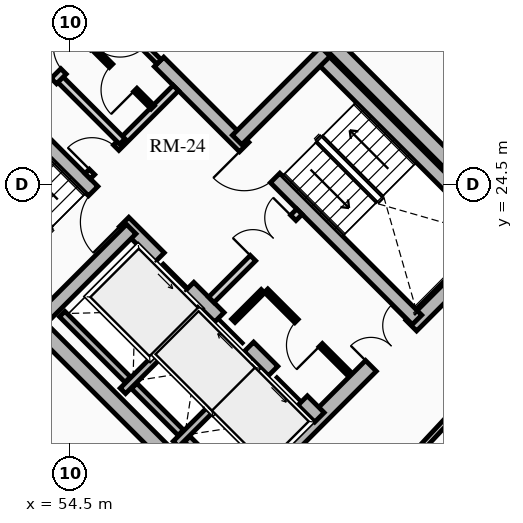
"""IFC4 building model, lengths in metres.
Left out: names, types, materials, properties, quantities, classifications, styles, units other than length and angle.
Written with IfcOpenShell. Run it as: python <this file> out.ifc"""

import sys

from ifc_helpers import new_model, si_unit, direction, frame, frame_2d, origin, place, context, subcontext, project, spatial, rectangle, extrude, source, transform, mapped, element, fill, save


model = new_model("IFC4")
c1 = context("Model", 3, precision=1e-05, world=origin(), true_north=direction((0.0, 1.0)))
c2 = subcontext(c1, "Body", "Model", "MODEL_VIEW")
j1 = project(units=[si_unit("LENGTHUNIT", "METRE"), si_unit("PLANEANGLEUNIT", "RADIAN")], contexts=[c1])
p1 = place(None, origin())
s1 = spatial("IfcSite", under=j1, at=p1, CompositionType="ELEMENT")
p2 = place(p1, origin())
s2 = spatial("IfcBuilding", under=s1, at=p2, CompositionType="ELEMENT")
p3 = place(p2, frame((0.0, 0.0, 205.39)))
s3 = spatial("IfcBuildingStorey", under=s2, at=p3, CompositionType="ELEMENT", Elevation=205.39)
for number, where, z_axis, x_axis in (
    (1, (58.702, 15.732, 0.0), (0.0, 0.0, 1.0), (-0.707, 0.707, 0.0)),
    (2, (66.268, 23.298, 0.0), (0.0, 0.0, 1.0), (-0.707, 0.707, 0.0)),
):
    element("IfcWall", number, at=place(p3, frame(where, z_axis=z_axis, x_axis=x_axis)), inside=s3, PredefinedType="SHEAR", context=c2, shape_type="SweptSolid", body=[
        extrude(rectangle(XDim=14.1, YDim=0.4, at=frame_2d((7.05, 0.0))), origin(), (0.0, 0.0, 1.0), 2.91),
    ])
p4 = place(p3, frame((58.561, 15.873, 0.0), z_axis=(0.0, 0.0, 1.0), x_axis=(0.707106781187, 0.707106781187, 0.0)))
e3 = element("IfcWall", 3, at=p4, inside=s3, PredefinedType="SHEAR", context=c2, shape_type="SweptSolid", body=[
    extrude(rectangle(XDim=10.7, YDim=0.4, at=frame_2d((5.35, 0.0))), origin(), (0.0, 0.0, 1.0), 2.91),
])
m1 = source(origin(), c2, "Body", "SweptSolid", [
    extrude(rectangle(XDim=1.5, YDim=2.02, at=frame_2d((0.75, 1.01))), frame((0.0, 0.21, 0.0), z_axis=(0.0, -1.0, 0.0), x_axis=(1.0, 0.0, 0.0)), (0.0, 0.0, 1.0), 0.42),
])
p5 = place(p4, frame((5.45, 0.0, 0.0)))
e4 = element("IfcOpeningElement", 4, at=p5, cuts=e3, PredefinedType="OPENING", context=c2, shape_type="MappedRepresentation", body=[
    mapped(m1, transform((0.0, 0.0, 0.0), x_axis=(1.0, 0.0, 0.0), y_axis=(0.0, 1.0, 0.0), z_axis=(0.0, 0.0, 1.0), scale=1.0)),
])
p6 = place(p3, frame((48.873, 25.561, 0.0), z_axis=(0.0, 0.0, 1.0), x_axis=(0.707106781187, 0.707106781187, 0.0)))
e5 = element("IfcWall", 5, at=p6, inside=s3, PredefinedType="SHEAR", context=c2, shape_type="SweptSolid", body=[
    extrude(rectangle(XDim=10.7, YDim=0.4, at=frame_2d((5.35, 0.0))), origin(), (0.0, 0.0, 1.0), 2.91),
])
p7 = place(p6, frame((4.6, 0.0, 0.0)))
e6 = element("IfcOpeningElement", 6, at=p7, cuts=e5, PredefinedType="OPENING", context=c2, shape_type="MappedRepresentation", body=[
    mapped(m1, transform((0.0, 0.0, 0.0), x_axis=(1.0, 0.0, 0.0), y_axis=(0.0, 1.0, 0.0), z_axis=(0.0, 0.0, 1.0), scale=1.0)),
])
p8 = place(p3, frame((61.06, 18.373, 0.0), z_axis=(0.0, 0.0, 1.0), x_axis=(-0.707106781187, 0.707106781187, 0.0)))
e7 = element("IfcWall", 7, at=p8, inside=s3, PredefinedType="SHEAR", context=c2, shape_type="SweptSolid", body=[
    extrude(rectangle(XDim=13.7, YDim=0.35, at=frame_2d((6.85, 0.0))), origin(), (0.0, 0.0, 1.0), 2.91),
])
m2 = source(origin(), c2, "Body", "SweptSolid", [
    extrude(rectangle(XDim=1.1, YDim=2.015, at=frame_2d((0.55, 1.007))), frame((0.0, 0.185, 0.0), z_axis=(0.0, -1.0, 0.0), x_axis=(1.0, 0.0, 0.0)), (0.0, 0.0, 1.0), 0.37),
])
p9 = place(p8, frame((4.85, 0.0, 0.0)))
e8 = element("IfcOpeningElement", 8, at=p9, cuts=e7, PredefinedType="OPENING", context=c2, shape_type="MappedRepresentation", body=[
    mapped(m2, transform((0.0, 0.0, 0.0), x_axis=(1.0, 0.0, 0.0), y_axis=(0.0, 1.0, 0.0), z_axis=(0.0, 0.0, 1.0), scale=1.0)),
])
p10 = place(p8, frame((0.625, 0.0, 0.0)))
e9 = element("IfcOpeningElement", 9, at=p10, cuts=e7, PredefinedType="OPENING", context=c2, shape_type="MappedRepresentation", body=[
    mapped(m2, transform((0.0, 0.0, 0.0), x_axis=(1.0, 0.0, 0.0), y_axis=(0.0, 1.0, 0.0), z_axis=(0.0, 0.0, 1.0), scale=1.0)),
])
p11 = place(p8, frame((2.625, 0.0, 0.0)))
e10 = element("IfcOpeningElement", 10, at=p11, cuts=e7, PredefinedType="OPENING", context=c2, shape_type="MappedRepresentation", body=[
    mapped(m2, transform((0.0, 0.0, 0.0), x_axis=(1.0, 0.0, 0.0), y_axis=(0.0, 1.0, 0.0), z_axis=(0.0, 0.0, 1.0), scale=1.0)),
])
m3 = source(origin(), c2, "Body", "SweptSolid", [
    extrude(rectangle(XDim=1.15, YDim=2.02, at=frame_2d((0.575, 1.01))), frame((0.0, 0.185, 0.0), z_axis=(0.0, -1.0, 0.0), x_axis=(1.0, 0.0, 0.0)), (0.0, 0.0, 1.0), 0.37),
])
p12 = place(p8, frame((7.27, 0.0, 0.0)))
e11 = element("IfcOpeningElement", 11, at=p12, cuts=e7, PredefinedType="OPENING", context=c2, shape_type="MappedRepresentation", body=[
    mapped(m3, transform((0.0, 0.0, 0.0), x_axis=(1.0, 0.0, 0.0), y_axis=(0.0, 1.0, 0.0), z_axis=(0.0, 0.0, 1.0), scale=1.0)),
])
p13 = place(p3, frame((63.627, 20.94, 0.0), z_axis=(0.0, 0.0, 1.0), x_axis=(-0.707119496762, 0.707094065383, 0.0)))
e12 = element("IfcWall", 12, at=p13, inside=s3, PredefinedType="SHEAR", context=c2, shape_type="SweptSolid", body=[
    extrude(rectangle(XDim=9.6, YDim=0.35, at=frame_2d((4.8, 0.0))), origin(), (0.0, 0.0, 1.0), 2.91),
])
p14 = place(p13, frame((5.28, 0.0, 0.0)))
e13 = element("IfcOpeningElement", 13, at=p14, cuts=e12, PredefinedType="OPENING", context=c2, shape_type="MappedRepresentation", body=[
    mapped(m3, transform((0.0, 0.0, 0.0), x_axis=(1.0, 0.0, 0.0), y_axis=(0.0, 1.0, 0.0), z_axis=(0.0, 0.0, 1.0), scale=1.0)),
])
p15 = place(p3, frame((53.922, 21.141, 0.0), z_axis=(0.0, 0.0, 1.0), x_axis=(-0.707106781187, 0.707106781187, 0.0)))
e14 = element("IfcWall", 14, at=p15, inside=s3, PredefinedType="SHEAR", context=c2, shape_type="SweptSolid", body=[
    extrude(rectangle(XDim=6.695, YDim=0.35, at=frame_2d((3.348, 0.0))), origin(), (0.0, 0.0, 1.0), 2.91),
])
p16 = place(p3, frame((53.784, 21.003, 0.0), z_axis=(0.0, 0.0, 1.0), x_axis=(0.707106781187, 0.707106781187, 0.0)))
e15 = element("IfcWall", 15, at=p16, inside=s3, PredefinedType="SHEAR", context=c2, shape_type="SweptSolid", body=[
    extrude(rectangle(XDim=3.285, YDim=0.35, at=frame_2d((1.643, 0.0))), origin(), (0.0, 0.0, 1.0), 2.91),
])
p17 = place(p3, frame((65.812, 23.125, 0.0), z_axis=(0.0, 0.0, 1.0), x_axis=(-0.707106781187, 0.707106781187, 0.0)))
e16 = element("IfcWall", 16, at=p17, inside=s3, PredefinedType="SHEAR", context=c2, shape_type="SweptSolid", body=[
    extrude(rectangle(XDim=6.695, YDim=0.35, at=frame_2d((3.348, 0.0))), origin(), (0.0, 0.0, 1.0), 2.91),
])
p18 = place(p3, frame((58.893, 25.674, 0.0), z_axis=(0.0, 0.0, 1.0), x_axis=(0.707106781187, 0.707106781187, 0.0)))
e17 = element("IfcWall", 17, at=p18, inside=s3, PredefinedType="SHEAR", context=c2, shape_type="SweptSolid", body=[
    extrude(rectangle(XDim=3.285, YDim=0.35, at=frame_2d((1.643, 0.0))), origin(), (0.0, 0.0, 1.0), 2.91),
])
p19 = place(p3, frame((55.888, 19.069, 0.0), z_axis=(0.0, 0.0, 1.0), x_axis=(0.707106781187, 0.707106781187, 0.0)))
e18 = element("IfcWall", 18, at=p19, inside=s3, PredefinedType="SHEAR", context=c2, shape_type="SweptSolid", body=[
    extrude(rectangle(XDim=2.97, YDim=0.2, at=frame_2d((1.485, 0.0))), origin(), (0.0, 0.0, 1.0), 2.91),
])
p20 = place(p3, frame((56.015, 19.366, 0.0), z_axis=(0.0, 0.0, 1.0), x_axis=(-0.707106781187, 0.707106781187, 0.0)))
e19 = element("IfcWall", 19, at=p20, inside=s3, PredefinedType="SHEAR", context=c2, shape_type="SweptSolid", body=[
    extrude(rectangle(XDim=2.44, YDim=0.2, at=frame_2d((1.22, 0.0))), origin(), (0.0, 0.0, 1.0), 2.91),
])
p21 = place(p3, frame((57.284, 17.673, 0.0), z_axis=(0.0, 0.0, 1.0), x_axis=(0.707147878904, 0.70706568108, 0.0)))
e20 = element("IfcWall", 20, at=p21, inside=s3, PredefinedType="SHEAR", context=c2, shape_type="SweptSolid", body=[
    extrude(rectangle(XDim=2.97, YDim=0.2, at=frame_2d((1.485, 0.0))), origin(), (0.0, 0.0, 1.0), 2.91),
])
p22 = place(p3, frame((57.412, 17.97, 0.0), z_axis=(0.0, 0.0, 1.0), x_axis=(-0.707106781187, 0.707106781187, 0.0)))
e21 = element("IfcWall", 21, at=p22, inside=s3, PredefinedType="SHEAR", context=c2, shape_type="SweptSolid", body=[
    extrude(rectangle(XDim=1.735, YDim=0.2, at=frame_2d((0.867, 0.0))), origin(), (0.0, 0.0, 1.0), 2.91),
])
p23 = place(p3, frame((58.737, 16.644, 0.0), z_axis=(0.0, 0.0, 1.0), x_axis=(-0.707032117043, 0.707181437447, 0.0)))
e22 = element("IfcWall", 22, at=p23, inside=s3, PredefinedType="SHEAR", context=c2, shape_type="SweptSolid", body=[
    extrude(rectangle(XDim=1.635, YDim=0.2, at=frame_2d((0.817, 0.0))), origin(), (0.0, 0.0, 1.0), 2.91),
])
p24 = place(p3, frame((58.214, 21.467, 0.0), z_axis=(0.0, 0.0, 1.0), x_axis=(0.707106781187, 0.707106781187, 0.0)))
e23 = element("IfcWall", 23, at=p24, inside=s3, PredefinedType="PARTITIONING", context=c2, shape_type="SweptSolid", body=[
    extrude(rectangle(XDim=3.28, YDim=0.2, at=frame_2d((1.64, 0.0))), origin(), (0.0, 0.0, 1.0), 2.685),
])
m4 = source(origin(), c2, "Body", "SweptSolid", [
    extrude(rectangle(XDim=1.5, YDim=2.02, at=frame_2d((0.75, 1.01))), frame((0.0, 0.11, 0.0), z_axis=(0.0, -1.0, 0.0), x_axis=(1.0, 0.0, 0.0)), (0.0, 0.0, 1.0), 0.22),
])
p25 = place(p24, frame((1.55, 0.0, 0.0)))
e24 = element("IfcOpeningElement", 24, at=p25, cuts=e23, PredefinedType="OPENING", context=c2, shape_type="MappedRepresentation", body=[
    mapped(m4, transform((0.0, 0.0, 0.0), x_axis=(1.0, 0.0, 0.0), y_axis=(0.0, 1.0, 0.0), z_axis=(0.0, 0.0, 1.0), scale=1.0)),
])
p26 = place(p3, frame((54.961, 24.719, 0.0), z_axis=(0.0, 0.0, 1.0), x_axis=(0.707106781187, 0.707106781187, 0.0)))
e25 = element("IfcWall", 25, at=p26, inside=s3, PredefinedType="PARTITIONING", context=c2, shape_type="SweptSolid", body=[
    extrude(rectangle(XDim=3.28, YDim=0.2, at=frame_2d((1.64, 0.0))), origin(), (0.0, 0.0, 1.0), 2.685),
])
m5 = source(origin(), c2, "Body", "SweptSolid", [
    extrude(rectangle(XDim=0.9, YDim=2.005, at=frame_2d((0.45, 1.002))), frame((0.0, 0.11, 0.0), z_axis=(0.0, -1.0, 0.0), x_axis=(1.0, 0.0, 0.0)), (0.0, 0.0, 1.0), 0.22),
])
p27 = place(p26, frame((0.16, 0.0, 0.0)))
e26 = element("IfcOpeningElement", 26, at=p27, cuts=e25, PredefinedType="OPENING", context=c2, shape_type="MappedRepresentation", body=[
    mapped(m5, transform((0.0, 0.0, 0.0), x_axis=(1.0, 0.0, 0.0), y_axis=(0.0, 1.0, 0.0), z_axis=(0.0, 0.0, 1.0), scale=1.0)),
])
p28 = place(p3, frame((55.874, 25.631, 0.0), z_axis=(0.0, 0.0, 1.0), x_axis=(-0.707157639372, 0.707055919343, 0.0)))
e27 = element("IfcWall", 27, at=p28, inside=s3, PredefinedType="PARTITIONING", context=c2, shape_type="SweptSolid", body=[
    extrude(rectangle(XDim=2.4, YDim=0.2, at=frame_2d((1.2, 0.0))), origin(), (0.0, 0.0, 1.0), 2.685),
])
p29 = place(p3, frame((53.264, 26.416, 0.0), z_axis=(0.0, 0.0, 1.0), x_axis=(0.707106781187, 0.707106781187, 0.0)))
e28 = element("IfcWall", 28, at=p29, inside=s3, PredefinedType="PARTITIONING", context=c2, shape_type="SweptSolid", body=[
    extrude(rectangle(XDim=3.28, YDim=0.2, at=frame_2d((1.64, 0.0))), origin(), (0.0, 0.0, 1.0), 2.685),
])
m6 = source(origin(), c2, "Body", "SweptSolid", [
    extrude(rectangle(XDim=1.0, YDim=2.015, at=frame_2d((0.5, 1.007))), frame((0.0, 0.11, 0.0), z_axis=(0.0, -1.0, 0.0), x_axis=(1.0, 0.0, 0.0)), (0.0, 0.0, 1.0), 0.22),
])
p30 = place(p29, frame((0.14, 0.0, 0.0)))
e29 = element("IfcOpeningElement", 29, at=p30, cuts=e28, PredefinedType="OPENING", context=c2, shape_type="MappedRepresentation", body=[
    mapped(m6, transform((0.0, 0.0, 0.0), x_axis=(1.0, 0.0, 0.0), y_axis=(0.0, 1.0, 0.0), z_axis=(0.0, 0.0, 1.0), scale=1.0)),
])
p31 = place(p29, frame((1.5, 0.0, 0.0)))
e30 = element("IfcOpeningElement", 30, at=p31, cuts=e28, PredefinedType="OPENING", context=c2, shape_type="MappedRepresentation", body=[
    mapped(m5, transform((0.0, 0.0, 0.0), x_axis=(1.0, 0.0, 0.0), y_axis=(0.0, 1.0, 0.0), z_axis=(0.0, 0.0, 1.0), scale=1.0)),
])
p32 = place(p3, frame((61.835, 19.529, 0.0), z_axis=(0.0, 0.0, 1.0), x_axis=(-0.707146413884, 0.707067146267, 0.0)))
e31 = element("IfcWall", 31, at=p32, inside=s3, PredefinedType="PARTITIONING", context=c2, shape_type="SweptSolid", body=[
    extrude(rectangle(XDim=3.08, YDim=0.125, at=frame_2d((1.54, 0.0))), origin(), (0.0, 0.0, 1.0), 2.685),
])
m7 = source(origin(), c2, "Body", "SweptSolid", [
    extrude(rectangle(XDim=0.9, YDim=2.005, at=frame_2d((0.45, 1.002))), frame((0.0, 0.073, 0.0), z_axis=(0.0, -1.0, 0.0), x_axis=(1.0, 0.0, 0.0)), (0.0, 0.0, 1.0), 0.145),
])
p33 = place(p32, frame((1.05, 0.0, 0.0)))
e32 = element("IfcOpeningElement", 32, at=p33, cuts=e31, PredefinedType="OPENING", context=c2, shape_type="MappedRepresentation", body=[
    mapped(m7, transform((0.0, 0.0, 0.0), x_axis=(1.0, 0.0, 0.0), y_axis=(0.0, 1.0, 0.0), z_axis=(0.0, 0.0, 1.0), scale=1.0)),
])
p34 = place(p3, frame((58.794, 20.915, 0.0), z_axis=(0.0, 0.0, 1.0), x_axis=(0.707106781187, 0.707106781187, 0.0)))
e33 = element("IfcWall", 33, at=p34, inside=s3, PredefinedType="PARTITIONING", context=c2, shape_type="SweptSolid", body=[
    extrude(rectangle(XDim=1.1, YDim=0.125, at=frame_2d((0.55, 0.0))), origin(), (0.0, 0.0, 1.0), 2.685),
])
p35 = place(p3, frame((56.673, 26.529, 0.0), z_axis=(0.0, 0.0, 1.0), x_axis=(-0.707052764397, 0.70716079385, 0.0)))
e34 = element("IfcWall", 34, at=p35, inside=s3, PredefinedType="PARTITIONING", context=c2, shape_type="SweptSolid", body=[
    extrude(rectangle(XDim=2.26, YDim=0.125, at=frame_2d((1.13, 0.0))), origin(), (0.0, 0.0, 1.0), 2.685),
])
p36 = place(p35, frame((0.65, 0.0, 0.0)))
e35 = element("IfcOpeningElement", 35, at=p36, cuts=e34, PredefinedType="OPENING", context=c2, shape_type="MappedRepresentation", body=[
    mapped(m7, transform((0.0, 0.0, 0.0), x_axis=(1.0, 0.0, 0.0), y_axis=(0.0, 1.0, 0.0), z_axis=(0.0, 0.0, 1.0), scale=1.0)),
])
p37 = place(p3, frame((56.839, 27.728, 0.0), z_axis=(0.0, 0.0, 1.0), x_axis=(-0.707106781187, 0.707106781187, 0.0)))
e36 = element("IfcWall", 36, at=p37, inside=s3, PredefinedType="PARTITIONING", context=c2, shape_type="SweptSolid", body=[
    extrude(rectangle(XDim=3.9, YDim=0.16, at=frame_2d((1.95, 0.0))), origin(), (0.0, 0.0, 1.0), 2.685),
])
m8 = source(origin(), c2, "Body", "SweptSolid", [
    extrude(rectangle(XDim=0.9, YDim=2.005, at=frame_2d((0.45, 1.002))), frame((0.0, 0.09, 0.0), z_axis=(0.0, -1.0, 0.0), x_axis=(1.0, 0.0, 0.0)), (0.0, 0.0, 1.0), 0.18),
])
p38 = place(p37, frame((0.55, 0.0, 0.0)))
e37 = element("IfcOpeningElement", 37, at=p38, cuts=e36, PredefinedType="OPENING", context=c2, shape_type="MappedRepresentation", body=[
    mapped(m8, transform((0.0, 0.0, 0.0), x_axis=(1.0, 0.0, 0.0), y_axis=(0.0, 1.0, 0.0), z_axis=(0.0, 0.0, 1.0), scale=1.0)),
])
p39 = place(p37, frame((2.35, 0.0, 0.0)))
e38 = element("IfcOpeningElement", 38, at=p39, cuts=e36, PredefinedType="OPENING", context=c2, shape_type="MappedRepresentation", body=[
    mapped(m8, transform((0.0, 0.0, 0.0), x_axis=(1.0, 0.0, 0.0), y_axis=(0.0, 1.0, 0.0), z_axis=(0.0, 0.0, 1.0), scale=1.0)),
])
p40 = place(p3, frame((51.914, 18.914, 0.0), z_axis=(0.0, 0.0, 1.0), x_axis=(0.699999313799, -0.714143515465, 0.0)))
e39 = element("IfcWall", 39, at=p40, inside=s3, PredefinedType="PARTITIONING", context=c2, shape_type="SweptSolid", body=[
    extrude(rectangle(XDim=6.162, YDim=0.15, at=frame_2d((3.081, 0.0))), origin(), (0.0, 0.0, 1.0), 2.255),
])
p41 = place(p3, frame((62.903, 16.667, 0.0), z_axis=(0.0, 0.0, 1.0), x_axis=(0.682371947497, 0.731005147225, 0.0)))
e40 = element("IfcWall", 40, at=p41, inside=s3, PredefinedType="PARTITIONING", context=c2, shape_type="SweptSolid", body=[
    extrude(rectangle(XDim=6.642, YDim=0.15, at=frame_2d((3.321, 0.0))), origin(), (0.0, 0.0, 1.0), 2.255),
])
m9 = source(origin(), c2, "Body", "SweptSolid", [
    extrude(rectangle(XDim=1.05, YDim=2.015, at=frame_2d((0.525, 1.007))), frame((0.0, 0.085, 0.0), z_axis=(0.0, -1.0, 0.0), x_axis=(1.0, 0.0, 0.0)), (0.0, 0.0, 1.0), 0.17),
])
p42 = place(p41, frame((2.796, 0.0, 0.0)))
e41 = element("IfcOpeningElement", 41, at=p42, cuts=e40, PredefinedType="OPENING", context=c2, shape_type="MappedRepresentation", body=[
    mapped(m9, transform((0.0, 0.0, 0.0), x_axis=(1.0, 0.0, 0.0), y_axis=(0.0, 1.0, 0.0), z_axis=(0.0, 0.0, 1.0), scale=1.0)),
])
m10 = source(origin(), c2, "Body", "SweptSolid", [
    extrude(rectangle(XDim=1.1, YDim=2.015, at=frame_2d((0.55, 1.007))), frame((0.0, 0.025, 0.0), z_axis=(0.0, -1.0, 0.0), x_axis=(1.0, 0.0, 0.0)), (0.0, 0.0, 1.0), 0.05),
])
p43 = place(p9, origin())
e42 = element("IfcDoor", 42, at=p43, inside=s3, OperationType="SLIDING_TO_LEFT", PredefinedType="DOOR", context=c2, shape_type="MappedRepresentation", body=[
    mapped(m10, transform((0.0, 0.0, 0.0), x_axis=(1.0, 0.0, 0.0), y_axis=(0.0, 1.0, 0.0), z_axis=(0.0, 0.0, 1.0), scale=1.0)),
])
fill(e8, e42)
p44 = place(p10, origin())
e43 = element("IfcDoor", 43, at=p44, inside=s3, OperationType="SLIDING_TO_LEFT", PredefinedType="DOOR", context=c2, shape_type="MappedRepresentation", body=[
    mapped(m10, transform((0.0, 0.0, 0.0), x_axis=(1.0, 0.0, 0.0), y_axis=(0.0, 1.0, 0.0), z_axis=(0.0, 0.0, 1.0), scale=1.0)),
])
fill(e9, e43)
p45 = place(p11, origin())
e44 = element("IfcDoor", 44, at=p45, inside=s3, OperationType="SLIDING_TO_RIGHT", PredefinedType="DOOR", context=c2, shape_type="MappedRepresentation", body=[
    mapped(m10, transform((0.0, 0.0, 0.0), x_axis=(1.0, 0.0, 0.0), y_axis=(0.0, 1.0, 0.0), z_axis=(0.0, 0.0, 1.0), scale=1.0)),
])
fill(e10, e44)
m11 = source(origin(), c2, "Body", "SweptSolid", [
    extrude(rectangle(XDim=1.15, YDim=2.02, at=frame_2d((0.575, 1.01))), frame((0.0, 0.025, 0.0), z_axis=(0.0, -1.0, 0.0), x_axis=(1.0, 0.0, 0.0)), (0.0, 0.0, 1.0), 0.05),
])
p46 = place(p12, origin())
e45 = element("IfcDoor", 45, at=p46, inside=s3, OperationType="SINGLE_SWING_LEFT", PredefinedType="DOOR", context=c2, shape_type="MappedRepresentation", body=[
    mapped(m11, transform((0.0, 0.0, 0.0), x_axis=(1.0, 0.0, 0.0), y_axis=(0.0, 1.0, 0.0), z_axis=(0.0, 0.0, 1.0), scale=1.0)),
])
fill(e11, e45)
p47 = place(p14, origin())
e46 = element("IfcDoor", 46, at=p47, inside=s3, OperationType="SINGLE_SWING_RIGHT", PredefinedType="DOOR", context=c2, shape_type="MappedRepresentation", body=[
    mapped(m11, transform((0.0, 0.0, 0.0), x_axis=(1.0, 0.0, 0.0), y_axis=(0.0, 1.0, 0.0), z_axis=(0.0, 0.0, 1.0), scale=1.0)),
])
fill(e13, e46)
m12 = source(origin(), c2, "Body", "SweptSolid", [
    extrude(rectangle(XDim=1.5, YDim=2.02, at=frame_2d((0.75, 1.01))), frame((0.0, 0.025, 0.0), z_axis=(0.0, -1.0, 0.0), x_axis=(1.0, 0.0, 0.0)), (0.0, 0.0, 1.0), 0.05),
])
p48 = place(p5, origin())
e47 = element("IfcDoor", 47, at=p48, inside=s3, OperationType="DOUBLE_DOOR_SINGLE_SWING", PredefinedType="DOOR", context=c2, shape_type="MappedRepresentation", body=[
    mapped(m12, transform((0.0, 0.0, 0.0), x_axis=(1.0, 0.0, 0.0), y_axis=(0.0, 1.0, 0.0), z_axis=(0.0, 0.0, 1.0), scale=1.0)),
])
fill(e4, e47)
p49 = place(p25, origin())
e48 = element("IfcDoor", 48, at=p49, inside=s3, OperationType="DOUBLE_DOOR_SINGLE_SWING", PredefinedType="DOOR", context=c2, shape_type="MappedRepresentation", body=[
    mapped(m12, transform((0.0, 0.0, 0.0), x_axis=(1.0, 0.0, 0.0), y_axis=(0.0, 1.0, 0.0), z_axis=(0.0, 0.0, 1.0), scale=1.0)),
])
fill(e24, e48)
m13 = source(origin(), c2, "Body", "SweptSolid", [
    extrude(rectangle(XDim=0.9, YDim=2.005, at=frame_2d((0.45, 1.002))), frame((0.0, 0.025, 0.0), z_axis=(0.0, -1.0, 0.0), x_axis=(1.0, 0.0, 0.0)), (0.0, 0.0, 1.0), 0.05),
])
p50 = place(p27, origin())
e49 = element("IfcDoor", 49, at=p50, inside=s3, OperationType="SINGLE_SWING_LEFT", PredefinedType="DOOR", context=c2, shape_type="MappedRepresentation", body=[
    mapped(m13, transform((0.0, 0.0, 0.0), x_axis=(1.0, 0.0, 0.0), y_axis=(0.0, 1.0, 0.0), z_axis=(0.0, 0.0, 1.0), scale=1.0)),
])
fill(e26, e49)
m14 = source(origin(), c2, "Body", "SweptSolid", [
    extrude(rectangle(XDim=1.0, YDim=2.015, at=frame_2d((0.5, 1.007))), frame((0.0, 0.025, 0.0), z_axis=(0.0, -1.0, 0.0), x_axis=(1.0, 0.0, 0.0)), (0.0, 0.0, 1.0), 0.05),
])
p51 = place(p30, origin())
e50 = element("IfcDoor", 50, at=p51, inside=s3, OperationType="SINGLE_SWING_RIGHT", PredefinedType="DOOR", context=c2, shape_type="MappedRepresentation", body=[
    mapped(m14, transform((0.0, 0.0, 0.0), x_axis=(1.0, 0.0, 0.0), y_axis=(0.0, 1.0, 0.0), z_axis=(0.0, 0.0, 1.0), scale=1.0)),
])
fill(e29, e50)
p52 = place(p33, origin())
e51 = element("IfcDoor", 51, at=p52, inside=s3, OperationType="SINGLE_SWING_LEFT", PredefinedType="DOOR", context=c2, shape_type="MappedRepresentation", body=[
    mapped(m13, transform((0.0, 0.0, 0.0), x_axis=(1.0, 0.0, 0.0), y_axis=(0.0, 1.0, 0.0), z_axis=(0.0, 0.0, 1.0), scale=1.0)),
])
fill(e32, e51)
p53 = place(p31, origin())
e52 = element("IfcDoor", 52, at=p53, inside=s3, OperationType="SINGLE_SWING_RIGHT", PredefinedType="DOOR", context=c2, shape_type="MappedRepresentation", body=[
    mapped(m13, transform((0.0, 0.0, 0.0), x_axis=(1.0, 0.0, 0.0), y_axis=(0.0, 1.0, 0.0), z_axis=(0.0, 0.0, 1.0), scale=1.0)),
])
fill(e30, e52)
p54 = place(p36, origin())
e53 = element("IfcDoor", 53, at=p54, inside=s3, OperationType="SINGLE_SWING_LEFT", PredefinedType="DOOR", context=c2, shape_type="MappedRepresentation", body=[
    mapped(m13, transform((0.0, 0.0, 0.0), x_axis=(1.0, 0.0, 0.0), y_axis=(0.0, 1.0, 0.0), z_axis=(0.0, 0.0, 1.0), scale=1.0)),
])
fill(e35, e53)
save(model, sys.argv[1])
